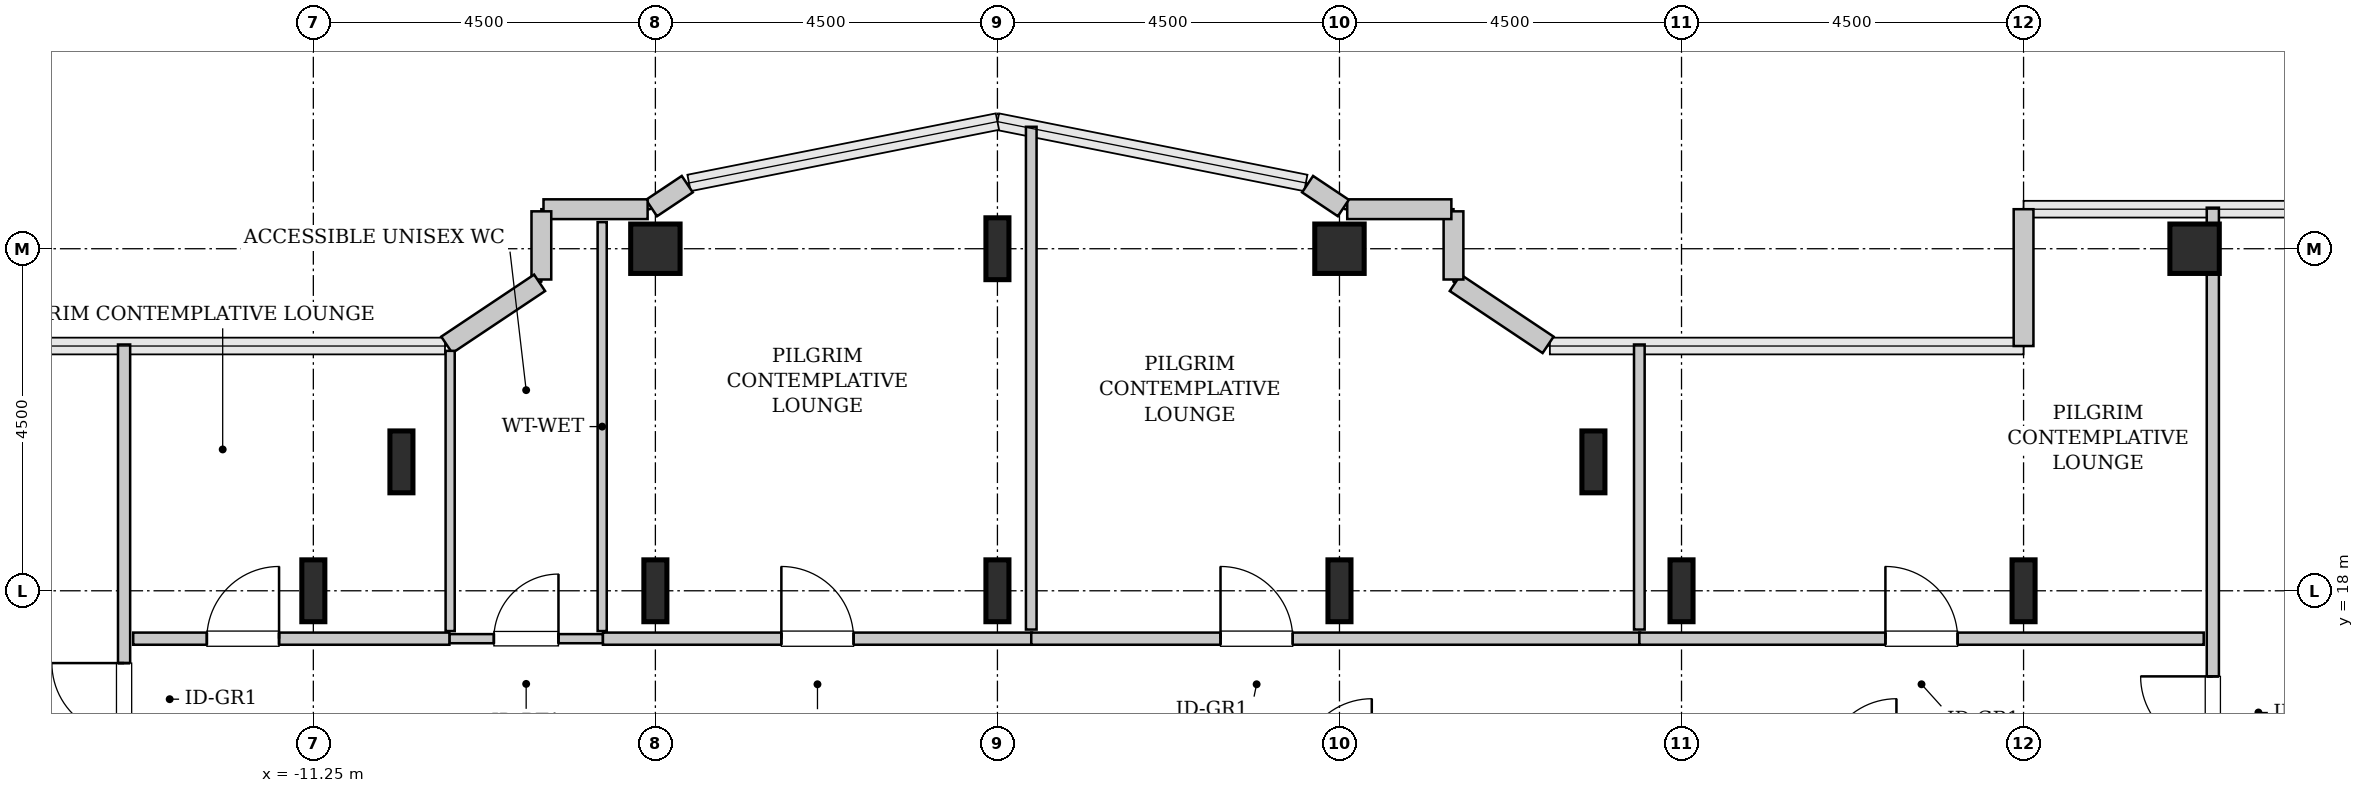
"""IFC4 building model, lengths in metres.
Left out: names, types, materials, properties, quantities, classifications, styles, units other than length and angle.
Written with IfcOpenShell. Run it as: python <this file> out.ifc"""

import sys

from ifc_helpers import new_model, si_unit, direction, frame, frame_2d, origin, origin_2d, place, context, subcontext, project, spatial, rectangle, hollow_rectangle, i_section, extrude, source, transform, mapped, element, fill, save


model = new_model("IFC4")
c1 = context("Model", 3, precision=1e-05, world=origin(), true_north=direction((0.0, 1.0)))
c2 = subcontext(c1, "Body", "Model", "MODEL_VIEW")
j1 = project(units=[si_unit("LENGTHUNIT", "METRE"), si_unit("PLANEANGLEUNIT", "RADIAN")], contexts=[c1])
p1 = place(None, origin())
s1 = spatial("IfcSite", under=j1, at=p1, CompositionType="ELEMENT")
p2 = place(p1, origin())
s2 = spatial("IfcBuilding", under=s1, at=p2, CompositionType="ELEMENT")
p3 = place(p2, frame((0.0, 0.0, 229.4)))
s3 = spatial("IfcBuildingStorey", under=s2, at=p3, CompositionType="ELEMENT", Elevation=229.4)
m1 = source(origin(), c2, "Body", "SweptSolid", [
    extrude(i_section(OverallWidth=0.303, OverallDepth=0.814, WebThickness=0.021, FlangeThickness=0.04, FilletRadius=0.03, at=origin_2d()), origin(), (0.0, 0.0, 1.0), 3.8),
])
for number, where, z_axis, x_axis in (
    (1, (-11.25, 18.0, 0.0), (0.0, 0.0, 1.0), (1.0, 0.0, 0.0)),
    (2, (-10.091, 19.696, 0.0), (0.0, 0.0, 1.0), (1.0, 0.0, 0.0)),
    (3, (-6.75, 18.0, 0.0), (0.0, 0.0, 1.0), (1.0, 0.0, 0.0)),
):
    element("IfcColumn", number, at=place(p3, frame(where, z_axis=z_axis, x_axis=x_axis)), inside=s3, PredefinedType="COLUMN", context=c2, shape_type="MappedRepresentation", body=[
        mapped(m1, transform((0.0, 0.0, 0.0), x_axis=(1.0, 0.0, 0.0), y_axis=(0.0, 1.0, 0.0), z_axis=(0.0, 0.0, 1.0), scale=1.0)),
    ])
m2 = source(origin(), c2, "Body", "SweptSolid", [
    extrude(hollow_rectangle(XDim=0.65, YDim=0.65, WallThickness=0.032, InnerFilletRadius=0.032, OuterFilletRadius=0.064, at=origin_2d()), origin(), (0.0, 0.0, 1.0), 3.8),
])
p4 = place(p3, frame((-6.75, 22.5, 0.0), z_axis=(0.0, 0.0, 1.0), x_axis=(1.0, 0.0, 0.0)))
e4 = element("IfcColumn", 4, at=p4, inside=s3, PredefinedType="COLUMN", context=c2, shape_type="MappedRepresentation", body=[
    mapped(m2, transform((0.0, 0.0, 0.0), x_axis=(1.0, 0.0, 0.0), y_axis=(0.0, 1.0, 0.0), z_axis=(0.0, 0.0, 1.0), scale=1.0)),
])
for number, where, z_axis, x_axis in (
    (5, (-2.25, 18.0, 0.0), (0.0, 0.0, 1.0), (1.0, 0.0, 0.0)),
    (6, (-2.25, 22.5, 0.0), (0.0, 0.0, 1.0), (1.0, 0.0, 0.0)),
    (7, (2.25, 18.0, 0.0), (0.0, 0.0, 1.0), (1.0, 0.0, 0.0)),
):
    element("IfcColumn", number, at=place(p3, frame(where, z_axis=z_axis, x_axis=x_axis)), inside=s3, PredefinedType="COLUMN", context=c2, shape_type="MappedRepresentation", body=[
        mapped(m1, transform((0.0, 0.0, 0.0), x_axis=(1.0, 0.0, 0.0), y_axis=(0.0, 1.0, 0.0), z_axis=(0.0, 0.0, 1.0), scale=1.0)),
    ])
p5 = place(p3, frame((2.25, 22.5, 0.0), z_axis=(0.0, 0.0, 1.0), x_axis=(1.0, 0.0, 0.0)))
e8 = element("IfcColumn", 8, at=p5, inside=s3, PredefinedType="COLUMN", context=c2, shape_type="MappedRepresentation", body=[
    mapped(m2, transform((0.0, 0.0, 0.0), x_axis=(1.0, 0.0, 0.0), y_axis=(0.0, 1.0, 0.0), z_axis=(0.0, 0.0, 1.0), scale=1.0)),
])
for number, where, z_axis, x_axis in (
    (9, (5.591, 19.696, 0.0), (0.0, 0.0, 1.0), (1.0, 0.0, 0.0)),
    (10, (6.75, 18.0, 0.0), (0.0, 0.0, 1.0), (1.0, 0.0, 0.0)),
    (11, (11.25, 18.0, 0.0), (0.0, 0.0, 1.0), (1.0, 0.0, 0.0)),
):
    element("IfcColumn", number, at=place(p3, frame(where, z_axis=z_axis, x_axis=x_axis)), inside=s3, PredefinedType="COLUMN", context=c2, shape_type="MappedRepresentation", body=[
        mapped(m1, transform((0.0, 0.0, 0.0), x_axis=(1.0, 0.0, 0.0), y_axis=(0.0, 1.0, 0.0), z_axis=(0.0, 0.0, 1.0), scale=1.0)),
    ])
p6 = place(p3, frame((13.5, 22.5, 0.0), z_axis=(0.0, 0.0, 1.0), x_axis=(1.0, 0.0, 0.0)))
e12 = element("IfcColumn", 12, at=p6, inside=s3, PredefinedType="COLUMN", context=c2, shape_type="MappedRepresentation", body=[
    mapped(m2, transform((0.0, 0.0, 0.0), x_axis=(1.0, 0.0, 0.0), y_axis=(0.0, 1.0, 0.0), z_axis=(0.0, 0.0, 1.0), scale=1.0)),
])
m3 = source(origin(), c2, "Body", "SweptSolid", [
    extrude(rectangle(XDim=1.8, YDim=0.26, at=frame_2d((0.9, 0.0))), origin(), (0.0, 0.0, 1.0), 3.55),
])
p7 = place(p3, frame((11.25, 23.02, 0.0), z_axis=(0.0, 0.0, 1.0), x_axis=(0.0, -1.0, 0.0)))
e13 = element("IfcWall", 13, at=p7, inside=s3, PredefinedType="SOLIDWALL", context=c2, shape_type="MappedRepresentation", body=[
    mapped(m3, transform((0.0, 0.0, 0.0), x_axis=(1.0, 0.0, 0.0), y_axis=(0.0, 1.0, 0.0), z_axis=(0.0, 0.0, 1.0), scale=1.0)),
])
m4 = source(origin(), c2, "Body", "SweptSolid", [
    extrude(rectangle(XDim=1.469, YDim=0.26, at=frame_2d((0.734, 0.0))), origin(), (0.0, 0.0, 1.0), 3.55),
])
p8 = place(p3, frame((4.995, 21.236, 0.0), z_axis=(0.0, 0.0, 1.0), x_axis=(-0.831461760506, 0.555581983884, 0.0)))
e14 = element("IfcWall", 14, at=p8, inside=s3, PredefinedType="SOLIDWALL", context=c2, shape_type="MappedRepresentation", body=[
    mapped(m4, transform((0.0, 0.0, 0.0), x_axis=(1.0, 0.0, 0.0), y_axis=(0.0, 1.0, 0.0), z_axis=(0.0, 0.0, 1.0), scale=1.0)),
])
m5 = source(origin(), c2, "Body", "SweptSolid", [
    extrude(rectangle(XDim=0.897, YDim=0.26, at=frame_2d((0.448, 0.0))), origin(), (0.0, 0.0, 1.0), 3.55),
])
p9 = place(p3, frame((3.75, 22.095, 0.0), z_axis=(0.0, 0.0, 1.0), x_axis=(0.0, 1.0, 0.0)))
e15 = element("IfcWall", 15, at=p9, inside=s3, PredefinedType="SOLIDWALL", context=c2, shape_type="MappedRepresentation", body=[
    mapped(m5, transform((0.0, 0.0, 0.0), x_axis=(1.0, 0.0, 0.0), y_axis=(0.0, 1.0, 0.0), z_axis=(0.0, 0.0, 1.0), scale=1.0)),
])
m6 = source(origin(), c2, "Body", "SweptSolid", [
    extrude(rectangle(XDim=1.37, YDim=0.26, at=frame_2d((0.685, 0.0))), origin(), (0.0, 0.0, 1.0), 3.55),
])
p10 = place(p3, frame((3.722, 23.02, 0.0), z_axis=(0.0, 0.0, 1.0), x_axis=(-1.0, 0.0, 0.0)))
e16 = element("IfcWall", 16, at=p10, inside=s3, PredefinedType="SOLIDWALL", context=c2, shape_type="MappedRepresentation", body=[
    mapped(m6, transform((0.0, 0.0, 0.0), x_axis=(1.0, 0.0, 0.0), y_axis=(0.0, 1.0, 0.0), z_axis=(0.0, 0.0, 1.0), scale=1.0)),
])
m7 = source(origin(), c2, "Body", "SweptSolid", [
    extrude(rectangle(XDim=0.565, YDim=0.26, at=frame_2d((0.283, 0.0))), origin(), (0.0, 0.0, 1.0), 3.55),
])
for number, where, z_axis, x_axis in (
    (17, (2.301, 23.036, 0.0), (0.0, 0.0, 1.0), (-0.832, 0.555, 0.0)),
    (18, (-6.331, 23.35, 0.0), (0.0, 0.0, 1.0), (-0.832, -0.555, 0.0)),
):
    element("IfcWall", number, at=place(p3, frame(where, z_axis=z_axis, x_axis=x_axis)), inside=s3, PredefinedType="SOLIDWALL", context=c2, shape_type="MappedRepresentation", body=[
        mapped(m7, transform((0.0, 0.0, 0.0), x_axis=(1.0, 0.0, 0.0), y_axis=(0.0, 1.0, 0.0), z_axis=(0.0, 0.0, 1.0), scale=1.0)),
    ])
p11 = place(p3, frame((-6.852, 23.02, 0.0), z_axis=(0.0, 0.0, 1.0), x_axis=(-1.0, 0.0, 0.0)))
e19 = element("IfcWall", 19, at=p11, inside=s3, PredefinedType="SOLIDWALL", context=c2, shape_type="MappedRepresentation", body=[
    mapped(m6, transform((0.0, 0.0, 0.0), x_axis=(1.0, 0.0, 0.0), y_axis=(0.0, 1.0, 0.0), z_axis=(0.0, 0.0, 1.0), scale=1.0)),
])
p12 = place(p3, frame((-8.25, 22.992, 0.0), z_axis=(0.0, 0.0, 1.0), x_axis=(0.0, -1.0, 0.0)))
e20 = element("IfcWall", 20, at=p12, inside=s3, PredefinedType="SOLIDWALL", context=c2, shape_type="MappedRepresentation", body=[
    mapped(m5, transform((0.0, 0.0, 0.0), x_axis=(1.0, 0.0, 0.0), y_axis=(0.0, 1.0, 0.0), z_axis=(0.0, 0.0, 1.0), scale=1.0)),
])
p13 = place(p3, frame((-8.273, 22.052, 0.0), z_axis=(0.0, 0.0, 1.0), x_axis=(-0.831461760506, -0.555581983884, 0.0)))
e21 = element("IfcWall", 21, at=p13, inside=s3, PredefinedType="SOLIDWALL", context=c2, shape_type="MappedRepresentation", body=[
    mapped(m4, transform((0.0, 0.0, 0.0), x_axis=(1.0, 0.0, 0.0), y_axis=(0.0, 1.0, 0.0), z_axis=(0.0, 0.0, 1.0), scale=1.0)),
])
m8 = source(origin(), c2, "Body", "SweptSolid", [
    extrude(rectangle(XDim=2.02, YDim=0.12, at=frame_2d((1.01, 0.0))), origin(), (0.0, 0.0, 1.0), 3.535),
])
p14 = place(p3, frame((-9.46, 17.37, 0.0), z_axis=(0.0, 0.0, 1.0), x_axis=(1.0, 0.0, 0.0)))
e22 = element("IfcWall", 22, at=p14, inside=s3, PredefinedType="PLUMBINGWALL", context=c2, shape_type="MappedRepresentation", body=[
    mapped(m8, transform((0.0, 0.0, 0.0), x_axis=(1.0, 0.0, 0.0), y_axis=(0.0, 1.0, 0.0), z_axis=(0.0, 0.0, 1.0), scale=1.0)),
])
p15 = place(p14, frame((0.585, 0.0, 0.0)))
e23 = element("IfcOpeningElement", 23, at=p15, cuts=e22, PredefinedType="OPENING", context=c2, shape_type="SweptSolid", body=[
    extrude(rectangle(XDim=0.85, YDim=2.1, at=frame_2d((0.425, 1.05))), frame((0.0, 0.07, 0.0), z_axis=(0.0, -1.0, 0.0), x_axis=(1.0, 0.0, 0.0)), (0.0, 0.0, 1.0), 0.14),
])
m9 = source(origin(), c2, "Body", "SweptSolid", [
    extrude(rectangle(XDim=5.38, YDim=0.12, at=frame_2d((2.69, 0.0))), origin(), (0.0, 0.0, 1.0), 3.535),
])
p16 = place(p3, frame((-7.45, 17.47, 0.0), z_axis=(0.0, 0.0, 1.0), x_axis=(0.0, 1.0, 0.0)))
e24 = element("IfcWall", 24, at=p16, inside=s3, PredefinedType="PLUMBINGWALL", context=c2, shape_type="MappedRepresentation", body=[
    mapped(m9, transform((0.0, 0.0, 0.0), x_axis=(1.0, 0.0, 0.0), y_axis=(0.0, 1.0, 0.0), z_axis=(0.0, 0.0, 1.0), scale=1.0)),
])
m10 = source(origin(), c2, "Body", "SweptSolid", [
    extrude(rectangle(XDim=3.687, YDim=0.12, at=frame_2d((1.843, 0.0))), origin(), (0.0, 0.0, 1.0), 3.535),
])
p17 = place(p3, frame((-9.45, 17.47, 0.0), z_axis=(0.0, 0.0, 1.0), x_axis=(0.0, 1.0, 0.0)))
e25 = element("IfcWall", 25, at=p17, inside=s3, PredefinedType="PLUMBINGWALL", context=c2, shape_type="MappedRepresentation", body=[
    mapped(m10, transform((0.0, 0.0, 0.0), x_axis=(1.0, 0.0, 0.0), y_axis=(0.0, 1.0, 0.0), z_axis=(0.0, 0.0, 1.0), scale=1.0)),
])
m11 = source(origin(), c2, "Body", "SweptSolid", [
    extrude(rectangle(XDim=5.502, YDim=0.16, at=frame_2d((2.751, 0.0))), origin(), (0.0, 0.0, 1.0), 3.535),
])
p18 = place(p3, frame((-13.74, 15.738, 0.0), z_axis=(0.0, 0.0, 1.0), x_axis=(0.0, 1.0, 0.0)))
e26 = element("IfcWall", 26, at=p18, inside=s3, PredefinedType="PARTITIONING", context=c2, shape_type="MappedRepresentation", body=[
    mapped(m11, transform((0.0, 0.0, 0.0), x_axis=(1.0, 0.0, 0.0), y_axis=(0.0, 1.0, 0.0), z_axis=(0.0, 0.0, 1.0), scale=1.0)),
])
p19 = place(p18, frame((0.361, 0.0, 0.0)))
e27 = element("IfcOpeningElement", 27, at=p19, cuts=e26, PredefinedType="OPENING", context=c2, shape_type="SweptSolid", body=[
    extrude(rectangle(XDim=0.95, YDim=2.1, at=frame_2d((0.475, 1.05))), frame((0.0, 0.09, 0.0), z_axis=(0.0, -1.0, 0.0), x_axis=(1.0, 0.0, 0.0)), (0.0, 0.0, 1.0), 0.18),
])
m12 = source(origin(), c2, "Body", "SweptSolid", [
    extrude(rectangle(XDim=7.653, YDim=0.16, at=frame_2d((3.826, 0.0))), origin(), (0.0, 0.0, 1.0), 3.535),
])
p20 = place(p3, frame((13.74, 15.387, 0.0), z_axis=(0.0, 0.0, 1.0), x_axis=(0.0, 1.0, 0.0)))
e28 = element("IfcWall", 28, at=p20, inside=s3, PredefinedType="PARTITIONING", context=c2, shape_type="MappedRepresentation", body=[
    mapped(m12, transform((0.0, 0.0, 0.0), x_axis=(1.0, 0.0, 0.0), y_axis=(0.0, 1.0, 0.0), z_axis=(0.0, 0.0, 1.0), scale=1.0)),
])
p21 = place(p20, frame((0.536, 0.0, 0.0)))
e29 = element("IfcOpeningElement", 29, at=p21, cuts=e28, PredefinedType="OPENING", context=c2, shape_type="SweptSolid", body=[
    extrude(rectangle(XDim=0.95, YDim=2.1, at=frame_2d((0.475, 1.05))), frame((0.0, 0.09, 0.0), z_axis=(0.0, -1.0, 0.0), x_axis=(1.0, 0.0, 0.0)), (0.0, 0.0, 1.0), 0.18),
])
m13 = source(origin(), c2, "Body", "SweptSolid", [
    extrude(rectangle(XDim=5.645, YDim=0.16, at=frame_2d((2.823, 0.0))), origin(), (0.0, 0.0, 1.0), 3.535),
])
p22 = place(p3, frame((-7.44, 17.37, 0.0), z_axis=(0.0, 0.0, 1.0), x_axis=(1.0, 0.0, 0.0)))
e30 = element("IfcWall", 30, at=p22, inside=s3, PredefinedType="PARTITIONING", context=c2, shape_type="MappedRepresentation", body=[
    mapped(m13, transform((0.0, 0.0, 0.0), x_axis=(1.0, 0.0, 0.0), y_axis=(0.0, 1.0, 0.0), z_axis=(0.0, 0.0, 1.0), scale=1.0)),
])
p23 = place(p22, frame((2.347, 0.0, 0.0)))
e31 = element("IfcOpeningElement", 31, at=p23, cuts=e30, PredefinedType="OPENING", context=c2, shape_type="SweptSolid", body=[
    extrude(rectangle(XDim=0.95, YDim=2.1, at=frame_2d((0.475, 1.05))), frame((0.0, 0.09, 0.0), z_axis=(0.0, -1.0, 0.0), x_axis=(1.0, 0.0, 0.0)), (0.0, 0.0, 1.0), 0.18),
])
m14 = source(origin(), c2, "Body", "SweptSolid", [
    extrude(rectangle(XDim=6.614, YDim=0.14, at=frame_2d((3.307, 0.0))), origin(), (0.0, 0.0, 1.0), 2.925),
])
p24 = place(p3, frame((-1.805, 17.49, 0.0), z_axis=(0.0, 0.0, 1.0), x_axis=(0.0, 1.0, 0.0)))
e32 = element("IfcWall", 32, at=p24, inside=s3, PredefinedType="PARTITIONING", context=c2, shape_type="MappedRepresentation", body=[
    mapped(m14, transform((0.0, 0.0, 0.0), x_axis=(1.0, 0.0, 0.0), y_axis=(0.0, 1.0, 0.0), z_axis=(0.0, 0.0, 1.0), scale=1.0)),
])
m15 = source(origin(), c2, "Body", "SweptSolid", [
    extrude(rectangle(XDim=4.16, YDim=0.16, at=frame_2d((2.08, 0.0))), origin(), (0.0, 0.0, 1.0), 3.535),
])
p25 = place(p3, frame((-13.62, 17.37, 0.0), z_axis=(0.0, 0.0, 1.0), x_axis=(1.0, 0.0, 0.0)))
e33 = element("IfcWall", 33, at=p25, inside=s3, PredefinedType="PARTITIONING", context=c2, shape_type="MappedRepresentation", body=[
    mapped(m15, transform((0.0, 0.0, 0.0), x_axis=(1.0, 0.0, 0.0), y_axis=(0.0, 1.0, 0.0), z_axis=(0.0, 0.0, 1.0), scale=1.0)),
])
p26 = place(p25, frame((0.969, 0.0, 0.0)))
e34 = element("IfcOpeningElement", 34, at=p26, cuts=e33, PredefinedType="OPENING", context=c2, shape_type="SweptSolid", body=[
    extrude(rectangle(XDim=0.95, YDim=2.1, at=frame_2d((0.475, 1.05))), frame((0.0, 0.09, 0.0), z_axis=(0.0, -1.0, 0.0), x_axis=(1.0, 0.0, 0.0)), (0.0, 0.0, 1.0), 0.18),
])
m16 = source(origin(), c2, "Body", "SweptSolid", [
    extrude(rectangle(XDim=8.01, YDim=0.16, at=frame_2d((4.005, 0.0))), origin(), (0.0, 0.0, 1.0), 3.535),
])
p27 = place(p3, frame((-1.805, 17.37, 0.0), z_axis=(0.0, 0.0, 1.0), x_axis=(1.0, 0.0, 0.0)))
e35 = element("IfcWall", 35, at=p27, inside=s3, PredefinedType="PARTITIONING", context=c2, shape_type="MappedRepresentation", body=[
    mapped(m16, transform((0.0, 0.0, 0.0), x_axis=(1.0, 0.0, 0.0), y_axis=(0.0, 1.0, 0.0), z_axis=(0.0, 0.0, 1.0), scale=1.0)),
])
p28 = place(p27, frame((2.49, 0.0, 0.0)))
e36 = element("IfcOpeningElement", 36, at=p28, cuts=e35, PredefinedType="OPENING", context=c2, shape_type="SweptSolid", body=[
    extrude(rectangle(XDim=0.95, YDim=2.1, at=frame_2d((0.475, 1.05))), frame((0.0, 0.09, 0.0), z_axis=(0.0, -1.0, 0.0), x_axis=(1.0, 0.0, 0.0)), (0.0, 0.0, 1.0), 0.18),
])
m17 = source(origin(), c2, "Body", "SweptSolid", [
    extrude(rectangle(XDim=3.75, YDim=0.14, at=frame_2d((1.875, 0.0))), origin(), (0.0, 0.0, 1.0), 3.535),
])
p29 = place(p3, frame((6.195, 17.49, 0.0), z_axis=(0.0, 0.0, 1.0), x_axis=(0.0, 1.0, 0.0)))
e37 = element("IfcWall", 37, at=p29, inside=s3, PredefinedType="PARTITIONING", context=c2, shape_type="MappedRepresentation", body=[
    mapped(m17, transform((0.0, 0.0, 0.0), x_axis=(1.0, 0.0, 0.0), y_axis=(0.0, 1.0, 0.0), z_axis=(0.0, 0.0, 1.0), scale=1.0)),
])
m18 = source(origin(), c2, "Body", "SweptSolid", [
    extrude(rectangle(XDim=7.425, YDim=0.16, at=frame_2d((3.712, 0.0))), origin(), (0.0, 0.0, 1.0), 3.535),
])
p30 = place(p3, frame((6.195, 17.37, 0.0), z_axis=(0.0, 0.0, 1.0), x_axis=(1.0, 0.0, 0.0)))
e38 = element("IfcWall", 38, at=p30, inside=s3, PredefinedType="PARTITIONING", context=c2, shape_type="MappedRepresentation", body=[
    mapped(m18, transform((0.0, 0.0, 0.0), x_axis=(1.0, 0.0, 0.0), y_axis=(0.0, 1.0, 0.0), z_axis=(0.0, 0.0, 1.0), scale=1.0)),
])
p31 = place(p30, frame((3.238, 0.0, 0.0)))
e39 = element("IfcOpeningElement", 39, at=p31, cuts=e38, PredefinedType="OPENING", context=c2, shape_type="SweptSolid", body=[
    extrude(rectangle(XDim=0.95, YDim=2.1, at=frame_2d((0.475, 1.05))), frame((0.0, 0.09, 0.0), z_axis=(0.0, -1.0, 0.0), x_axis=(1.0, 0.0, 0.0)), (0.0, 0.0, 1.0), 0.18),
])
m19 = source(origin(), c2, "Body", "SweptSolid", [
    extrude(rectangle(XDim=0.85, YDim=2.1, at=frame_2d((0.425, 1.05))), frame((0.0, 0.025, 0.0), z_axis=(0.0, -1.0, 0.0), x_axis=(1.0, 0.0, 0.0)), (0.0, 0.0, 1.0), 0.05),
])
p32 = place(p15, origin())
e40 = element("IfcDoor", 40, at=p32, inside=s3, OperationType="SINGLE_SWING_RIGHT", PredefinedType="DOOR", context=c2, shape_type="MappedRepresentation", body=[
    mapped(m19, transform((0.0, 0.0, 0.0), x_axis=(1.0, 0.0, 0.0), y_axis=(0.0, 1.0, 0.0), z_axis=(0.0, 0.0, 1.0), scale=1.0)),
])
fill(e23, e40)
m20 = source(origin(), c2, "Body", "SweptSolid", [
    extrude(rectangle(XDim=0.95, YDim=2.1, at=frame_2d((0.475, 1.05))), frame((0.0, 0.025, 0.0), z_axis=(0.0, -1.0, 0.0), x_axis=(1.0, 0.0, 0.0)), (0.0, 0.0, 1.0), 0.05),
])
p33 = place(p19, origin())
e41 = element("IfcDoor", 41, at=p33, inside=s3, OperationType="SINGLE_SWING_RIGHT", PredefinedType="DOOR", context=c2, shape_type="MappedRepresentation", body=[
    mapped(m20, transform((0.0, 0.0, 0.0), x_axis=(1.0, 0.0, 0.0), y_axis=(0.0, 1.0, 0.0), z_axis=(0.0, 0.0, 1.0), scale=1.0)),
])
fill(e27, e41)
p34 = place(p21, origin())
e42 = element("IfcDoor", 42, at=p34, inside=s3, OperationType="SINGLE_SWING_RIGHT", PredefinedType="DOOR", context=c2, shape_type="MappedRepresentation", body=[
    mapped(m20, transform((0.0, 0.0, 0.0), x_axis=(1.0, 0.0, 0.0), y_axis=(0.0, 1.0, 0.0), z_axis=(0.0, 0.0, 1.0), scale=1.0)),
])
fill(e29, e42)
p35 = place(p23, origin())
e43 = element("IfcDoor", 43, at=p35, inside=s3, OperationType="SINGLE_SWING_LEFT", PredefinedType="DOOR", context=c2, shape_type="MappedRepresentation", body=[
    mapped(m20, transform((0.0, 0.0, 0.0), x_axis=(1.0, 0.0, 0.0), y_axis=(0.0, 1.0, 0.0), z_axis=(0.0, 0.0, 1.0), scale=1.0)),
])
fill(e31, e43)
p36 = place(p26, origin())
e44 = element("IfcDoor", 44, at=p36, inside=s3, OperationType="SINGLE_SWING_RIGHT", PredefinedType="DOOR", context=c2, shape_type="MappedRepresentation", body=[
    mapped(m20, transform((0.0, 0.0, 0.0), x_axis=(1.0, 0.0, 0.0), y_axis=(0.0, 1.0, 0.0), z_axis=(0.0, 0.0, 1.0), scale=1.0)),
])
fill(e34, e44)
p37 = place(p28, origin())
e45 = element("IfcDoor", 45, at=p37, inside=s3, OperationType="SINGLE_SWING_LEFT", PredefinedType="DOOR", context=c2, shape_type="MappedRepresentation", body=[
    mapped(m20, transform((0.0, 0.0, 0.0), x_axis=(1.0, 0.0, 0.0), y_axis=(0.0, 1.0, 0.0), z_axis=(0.0, 0.0, 1.0), scale=1.0)),
])
fill(e36, e45)
p38 = place(p31, origin())
e46 = element("IfcDoor", 46, at=p38, inside=s3, OperationType="SINGLE_SWING_LEFT", PredefinedType="DOOR", context=c2, shape_type="MappedRepresentation", body=[
    mapped(m20, transform((0.0, 0.0, 0.0), x_axis=(1.0, 0.0, 0.0), y_axis=(0.0, 1.0, 0.0), z_axis=(0.0, 0.0, 1.0), scale=1.0)),
])
fill(e39, e46)
save(model, sys.argv[1])
